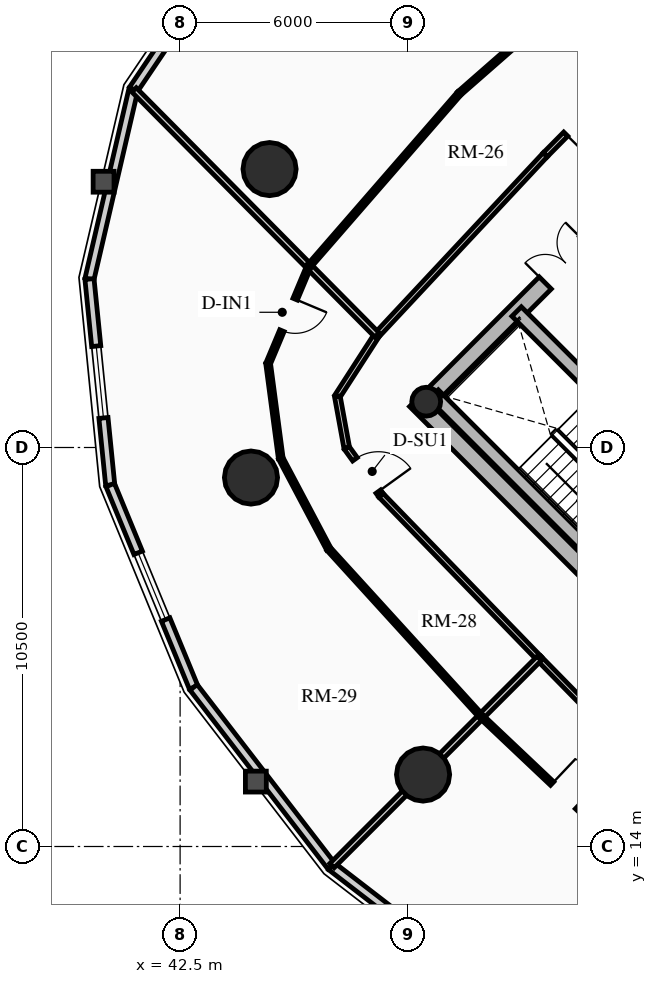
"""IFC4 building model, lengths in metres.
Left out: names, types, materials, properties, quantities, classifications, styles, units other than length and angle.
Written with IfcOpenShell. Run it as: python <this file> out.ifc"""

import sys

from ifc_helpers import new_model, si_unit, direction, frame, frame_2d, origin, origin_2d, place, context, subcontext, project, spatial, rectangle, circle, hollow_circle, extrude, source, transform, mapped, element, fill, save


model = new_model("IFC4")
c1 = context("Model", 3, precision=1e-05, world=origin(), true_north=direction((0.0, 1.0)))
c2 = subcontext(c1, "Body", "Model", "MODEL_VIEW")
j1 = project(units=[si_unit("LENGTHUNIT", "METRE"), si_unit("PLANEANGLEUNIT", "RADIAN")], contexts=[c1])
p1 = place(None, origin())
s1 = spatial("IfcSite", under=j1, at=p1, CompositionType="ELEMENT")
p2 = place(p1, origin())
s2 = spatial("IfcBuilding", under=s1, at=p2, CompositionType="ELEMENT")
p3 = place(p2, frame((0.0, 0.0, 87.61)))
s3 = spatial("IfcBuildingStorey", under=s2, at=p3, CompositionType="ELEMENT", Elevation=87.61)
p4 = place(p3, frame((58.737, 15.697, 0.0), z_axis=(0.0, 0.0, 1.0), x_axis=(-0.707106781187, 0.707106781187, 0.0)))
e1 = element("IfcWall", 1, at=p4, inside=s3, PredefinedType="SHEAR", context=c2, shape_type="SweptSolid", body=[
    extrude(rectangle(XDim=14.2, YDim=0.45, at=frame_2d((7.1, 0.0))), origin(), (0.0, 0.0, 1.0), 2.91),
])
p5 = place(p3, frame((48.856, 25.578, 0.0), z_axis=(0.0, 0.0, 1.0), x_axis=(0.707106781187, 0.707106781187, 0.0)))
e2 = element("IfcWall", 2, at=p5, inside=s3, PredefinedType="SHEAR", context=c2, shape_type="SweptSolid", body=[
    extrude(rectangle(XDim=10.7, YDim=0.45, at=frame_2d((5.35, 0.0))), origin(), (0.0, 0.0, 1.0), 2.91),
])
m1 = source(origin(), c2, "Body", "SweptSolid", [
    extrude(rectangle(XDim=1.5, YDim=2.02, at=frame_2d((0.75, 1.01))), frame((0.0, 0.235, 0.0), z_axis=(0.0, -1.0, 0.0), x_axis=(1.0, 0.0, 0.0)), (0.0, 0.0, 1.0), 0.47),
])
p6 = place(p5, frame((4.6, 0.0, 0.0)))
e3 = element("IfcOpeningElement", 3, at=p6, cuts=e2, PredefinedType="OPENING", context=c2, shape_type="MappedRepresentation", body=[
    mapped(m1, transform((0.0, 0.0, 0.0), x_axis=(1.0, 0.0, 0.0), y_axis=(0.0, 1.0, 0.0), z_axis=(0.0, 0.0, 1.0), scale=1.0)),
])
p7 = place(p3, frame((61.078, 18.355, 0.0), z_axis=(0.0, 0.0, 1.0), x_axis=(-0.707106781187, 0.707106781187, 0.0)))
e4 = element("IfcWall", 4, at=p7, inside=s3, PredefinedType="SHEAR", context=c2, shape_type="SweptSolid", body=[
    extrude(rectangle(XDim=13.75, YDim=0.35, at=frame_2d((6.875, 0.0))), origin(), (0.0, 0.0, 1.0), 2.91),
])
m2 = source(origin(), c2, "Body", "SweptSolid", [
    extrude(rectangle(XDim=1.1, YDim=2.015, at=frame_2d((0.55, 1.007))), frame((0.0, 0.185, 0.0), z_axis=(0.0, -1.0, 0.0), x_axis=(1.0, 0.0, 0.0)), (0.0, 0.0, 1.0), 0.37),
])
p8 = place(p7, frame((4.875, 0.0, 0.0)))
e5 = element("IfcOpeningElement", 5, at=p8, cuts=e4, PredefinedType="OPENING", context=c2, shape_type="MappedRepresentation", body=[
    mapped(m2, transform((0.0, 0.0, 0.0), x_axis=(1.0, 0.0, 0.0), y_axis=(0.0, 1.0, 0.0), z_axis=(0.0, 0.0, 1.0), scale=1.0)),
])
m3 = source(origin(), c2, "Body", "SweptSolid", [
    extrude(rectangle(XDim=1.15, YDim=2.02, at=frame_2d((0.575, 1.01))), frame((0.0, 0.185, 0.0), z_axis=(0.0, -1.0, 0.0), x_axis=(1.0, 0.0, 0.0)), (0.0, 0.0, 1.0), 0.37),
])
p9 = place(p7, frame((7.295, 0.0, 0.0)))
e6 = element("IfcOpeningElement", 6, at=p9, cuts=e4, PredefinedType="OPENING", context=c2, shape_type="MappedRepresentation", body=[
    mapped(m3, transform((0.0, 0.0, 0.0), x_axis=(1.0, 0.0, 0.0), y_axis=(0.0, 1.0, 0.0), z_axis=(0.0, 0.0, 1.0), scale=1.0)),
])
p10 = place(p3, frame((53.922, 21.141, 0.0), z_axis=(0.0, 0.0, 1.0), x_axis=(-0.707088616009, 0.707124945897, 0.0)))
e7 = element("IfcWall", 7, at=p10, inside=s3, PredefinedType="SHEAR", context=c2, shape_type="SweptSolid", body=[
    extrude(rectangle(XDim=6.72, YDim=0.35, at=frame_2d((3.36, 0.0))), origin(), (0.0, 0.0, 1.0), 2.91),
])
p11 = place(p3, frame((48.976, 25.706, 0.0), z_axis=(0.0, 0.0, 1.0), x_axis=(0.707106781187, 0.707106781187, 0.0)))
e8 = element("IfcColumn", 8, at=p11, inside=s3, PredefinedType="COLUMN", context=c2, shape_type="SweptSolid", body=[
    extrude(hollow_circle(Radius=0.38, WallThickness=0.032, at=origin_2d()), origin(), (0.0, 0.0, 1.0), 2.91),
])
for number, where, z_axis, x_axis in (
    (9, (44.854, 31.827, 0.0), (0.0, 0.0, 1.0), (1.0, 0.0, 0.0)),
    (10, (44.365, 23.709, 0.0), (0.0, 0.0, 1.0), (1.0, 0.0, 0.0)),
    (11, (48.893, 15.893, 0.0), (0.0, 0.0, 1.0), (1.0, 0.0, 0.0)),
):
    element("IfcColumn", number, at=place(p3, frame(where, z_axis=z_axis, x_axis=x_axis)), inside=s3, PredefinedType="USERDEFINED", context=c2, shape_type="SweptSolid", body=[
        extrude(circle(Radius=0.7, at=origin_2d()), origin(), (0.0, 0.0, 1.0), 2.91),
    ])
p12 = place(p3, frame((41.271, 33.92, 0.0), z_axis=(0.0, 0.0, 1.0), x_axis=(0.559572880421, 0.828781148131, 0.0)))
e12 = element("IfcWall", 12, at=p12, inside=s3, PredefinedType="SOLIDWALL", context=c2, shape_type="SweptSolid", body=[
    extrude(rectangle(XDim=4.905, YDim=0.24, at=frame_2d((2.452, 0.0))), origin(), (0.0, 0.0, 1.0), 2.179),
])
m4 = source(origin(), c2, "Body", "SweptSolid", [
    extrude(rectangle(XDim=1.9, YDim=1.35, at=frame_2d((0.95, 0.675))), frame((0.0, 0.13, 0.0), z_axis=(0.0, -1.0, 0.0), x_axis=(1.0, 0.0, 0.0)), (0.0, 0.0, 1.0), 0.26),
])
p13 = place(p12, frame((1.502, 0.0, 0.65)))
e13 = element("IfcOpeningElement", 13, at=p13, cuts=e12, PredefinedType="OPENING", context=c2, shape_type="MappedRepresentation", body=[
    mapped(m4, transform((0.0, 0.0, 0.0), x_axis=(1.0, 0.0, 0.0), y_axis=(0.0, 1.0, 0.0), z_axis=(0.0, 0.0, 1.0), scale=1.0)),
])
p14 = place(p3, frame((40.115, 28.933, 0.0), z_axis=(0.0, 0.0, 1.0), x_axis=(0.225834725257, 0.974165631126, 0.0)))
e14 = element("IfcWall", 14, at=p14, inside=s3, PredefinedType="SOLIDWALL", context=c2, shape_type="SweptSolid", body=[
    extrude(rectangle(XDim=5.119, YDim=0.24, at=frame_2d((2.56, 0.0))), origin(), (0.0, 0.0, 1.0), 2.179),
])
p15 = place(p3, frame((40.661, 23.513, 0.0), z_axis=(0.0, 0.0, 1.0), x_axis=(-0.10015591906, 0.994971754311, 0.0)))
e15 = element("IfcWall", 15, at=p15, inside=s3, PredefinedType="SOLIDWALL", context=c2, shape_type="SweptSolid", body=[
    extrude(rectangle(XDim=5.448, YDim=0.24, at=frame_2d((2.724, 0.0))), origin(), (0.0, 0.0, 1.0), 2.179),
])
p16 = place(p15, frame((1.774, 0.0, 0.65)))
e16 = element("IfcOpeningElement", 16, at=p16, cuts=e15, PredefinedType="OPENING", context=c2, shape_type="MappedRepresentation", body=[
    mapped(m4, transform((0.0, 0.0, 0.0), x_axis=(1.0, 0.0, 0.0), y_axis=(0.0, 1.0, 0.0), z_axis=(0.0, 0.0, 1.0), scale=1.0)),
])
p17 = place(p3, frame((42.855, 18.189, 0.0), z_axis=(0.0, 0.0, 1.0), x_axis=(-0.381027003055, 0.924563909604, 0.0)))
e17 = element("IfcWall", 17, at=p17, inside=s3, PredefinedType="SOLIDWALL", context=c2, shape_type="SweptSolid", body=[
    extrude(rectangle(XDim=5.758, YDim=0.24, at=frame_2d((2.879, 0.0))), origin(), (0.0, 0.0, 1.0), 2.179),
])
p18 = place(p17, frame((1.929, 0.0, 0.65)))
e18 = element("IfcOpeningElement", 18, at=p18, cuts=e17, PredefinedType="OPENING", context=c2, shape_type="MappedRepresentation", body=[
    mapped(m4, transform((0.0, 0.0, 0.0), x_axis=(1.0, 0.0, 0.0), y_axis=(0.0, 1.0, 0.0), z_axis=(0.0, 0.0, 1.0), scale=1.0)),
])
p19 = place(p3, frame((46.483, 13.483, 0.0), z_axis=(0.0, 0.0, 1.0), x_axis=(-0.61054437102, 0.791982052206, 0.0)))
e19 = element("IfcWall", 19, at=p19, inside=s3, PredefinedType="SOLIDWALL", context=c2, shape_type="SweptSolid", body=[
    extrude(rectangle(XDim=5.942, YDim=0.24, at=frame_2d((2.971, 0.0))), origin(), (0.0, 0.0, 1.0), 2.179),
])
p20 = place(p3, frame((51.189, 9.855, 0.0), z_axis=(0.0, 0.0, 1.0), x_axis=(-0.791982052206, 0.61054437102, 0.0)))
e20 = element("IfcWall", 20, at=p20, inside=s3, PredefinedType="SOLIDWALL", context=c2, shape_type="SweptSolid", body=[
    extrude(rectangle(XDim=5.942, YDim=0.24, at=frame_2d((2.971, 0.0))), origin(), (0.0, 0.0, 1.0), 2.179),
])
p21 = place(p20, frame((2.021, 0.0, 0.65)))
e21 = element("IfcOpeningElement", 21, at=p21, cuts=e20, PredefinedType="OPENING", context=c2, shape_type="MappedRepresentation", body=[
    mapped(m4, transform((0.0, 0.0, 0.0), x_axis=(1.0, 0.0, 0.0), y_axis=(0.0, 1.0, 0.0), z_axis=(0.0, 0.0, 1.0), scale=1.0)),
])
p22 = place(p3, frame((54.475, 34.591, 0.0), z_axis=(0.0, 0.0, 1.0), x_axis=(-0.703869646439, -0.710329163714, 0.0)))
e22 = element("IfcWall", 22, at=p22, inside=s3, PredefinedType="PARTITIONING", context=c2, shape_type="SweptSolid", body=[
    extrude(rectangle(XDim=3.364, YDim=0.15, at=frame_2d((1.682, 0.0))), origin(), (0.0, 0.0, 1.0), 2.225),
])
m5 = source(origin(), c2, "Body", "SweptSolid", [
    extrude(rectangle(XDim=1.05, YDim=2.015, at=frame_2d((0.525, 1.007))), frame((0.0, 0.085, 0.0), z_axis=(0.0, -1.0, 0.0), x_axis=(1.0, 0.0, 0.0)), (0.0, 0.0, 1.0), 0.17),
])
p23 = place(p22, frame((1.546, 0.0, 0.0)))
e23 = element("IfcOpeningElement", 23, at=p23, cuts=e22, PredefinedType="OPENING", context=c2, shape_type="MappedRepresentation", body=[
    mapped(m5, transform((0.0, 0.0, 0.0), x_axis=(1.0, 0.0, 0.0), y_axis=(0.0, 1.0, 0.0), z_axis=(0.0, 0.0, 1.0), scale=1.0)),
])
p24 = place(p3, frame((52.107, 32.202, 0.0), z_axis=(0.0, 0.0, 1.0), x_axis=(-0.682605209028, -0.730787334734, 0.0)))
e24 = element("IfcWall", 24, at=p24, inside=s3, PredefinedType="PARTITIONING", context=c2, shape_type="SweptSolid", body=[
    extrude(rectangle(XDim=6.486, YDim=0.15, at=frame_2d((3.243, 0.0))), origin(), (0.0, 0.0, 1.0), 2.225),
])
p25 = place(p3, frame((47.68, 27.462, 0.0), z_axis=(0.0, 0.0, 1.0), x_axis=(-0.542097952486, -0.840315303865, 0.0)))
e25 = element("IfcWall", 25, at=p25, inside=s3, PredefinedType="PARTITIONING", context=c2, shape_type="SweptSolid", body=[
    extrude(rectangle(XDim=1.923, YDim=0.15, at=frame_2d((0.961, 0.0))), origin(), (0.0, 0.0, 1.0), 2.225),
])
p26 = place(p3, frame((46.637, 25.846, 0.0), z_axis=(0.0, 0.0, 1.0), x_axis=(0.179617307107, -0.983736561782, 0.0)))
e26 = element("IfcWall", 26, at=p26, inside=s3, PredefinedType="PARTITIONING", context=c2, shape_type="SweptSolid", body=[
    extrude(rectangle(XDim=1.38, YDim=0.15, at=frame_2d((0.69, 0.0))), origin(), (0.0, 0.0, 1.0), 2.225),
])
p27 = place(p3, frame((46.885, 24.489, 0.0), z_axis=(0.0, 0.0, 1.0), x_axis=(0.585716430945, -0.810516047047, 0.0)))
e27 = element("IfcWall", 27, at=p27, inside=s3, PredefinedType="PARTITIONING", context=c2, shape_type="SweptSolid", body=[
    extrude(rectangle(XDim=1.539, YDim=0.15, at=frame_2d((0.77, 0.0))), origin(), (0.0, 0.0, 1.0), 2.225),
])
p28 = place(p27, frame((0.369, 0.0, 0.0)))
e28 = element("IfcOpeningElement", 28, at=p28, cuts=e27, PredefinedType="OPENING", context=c2, shape_type="MappedRepresentation", body=[
    mapped(m5, transform((0.0, 0.0, 0.0), x_axis=(1.0, 0.0, 0.0), y_axis=(0.0, 1.0, 0.0), z_axis=(0.0, 0.0, 1.0), scale=1.0)),
])
p29 = place(p3, frame((47.786, 23.242, 0.0), z_axis=(0.0, 0.0, 1.0), x_axis=(0.696183456981, -0.717863910659, 0.0)))
e29 = element("IfcWall", 29, at=p29, inside=s3, PredefinedType="PARTITIONING", context=c2, shape_type="SweptSolid", body=[
    extrude(rectangle(XDim=5.979, YDim=0.15, at=frame_2d((2.99, 0.0))), origin(), (0.0, 0.0, 1.0), 2.655),
])
p30 = place(p3, frame((51.949, 18.949, 0.0), z_axis=(0.0, 0.0, 1.0), x_axis=(0.699801520154, -0.714337337951, 0.0)))
e30 = element("IfcWall", 30, at=p30, inside=s3, PredefinedType="PARTITIONING", context=c2, shape_type="SweptSolid", body=[
    extrude(rectangle(XDim=6.097, YDim=0.15, at=frame_2d((3.048, 0.0))), origin(), (0.0, 0.0, 1.0), 2.225),
])
p31 = place(p3, frame((47.68, 27.462, 0.0), z_axis=(0.0, 0.0, 1.0), x_axis=(-0.703913074907, 0.710286127539, 0.0)))
e31 = element("IfcWall", 31, at=p31, inside=s3, PredefinedType="PARTITIONING", context=c2, shape_type="SweptSolid", body=[
    extrude(rectangle(XDim=9.079, YDim=0.16, at=frame_2d((4.54, 0.0))), origin(), (0.0, 0.0, 1.0), 2.179),
])
p32 = place(p3, frame((51.949, 18.949, 0.0), z_axis=(0.0, 0.0, 1.0), x_axis=(-0.707106781187, -0.707106781187, 0.0)))
e32 = element("IfcWall", 32, at=p32, inside=s3, PredefinedType="PARTITIONING", context=c2, shape_type="SweptSolid", body=[
    extrude(rectangle(XDim=7.711, YDim=0.16, at=frame_2d((3.855, 0.0))), origin(), (0.0, 0.0, 1.0), 2.179),
])
p33 = place(p3, frame((52.687, 36.305, 0.0), z_axis=(0.0, 0.0, 1.0), x_axis=(-0.752332345919, -0.658783759123, 0.0)))
e33 = element("IfcWall", 33, at=p33, inside=s3, PredefinedType="PARTITIONING", context=c2, shape_type="SweptSolid", body=[
    extrude(rectangle(XDim=3.776, YDim=0.125, at=frame_2d((1.888, 0.0))), origin(), (0.0, 0.0, 1.0), 2.225),
])
p34 = place(p3, frame((49.845, 33.817, 0.0), z_axis=(0.0, 0.0, 1.0), x_axis=(-0.656101508867, -0.754672650931, 0.0)))
e34 = element("IfcWall", 34, at=p34, inside=s3, PredefinedType="PARTITIONING", context=c2, shape_type="SweptSolid", body=[
    extrude(rectangle(XDim=6.029, YDim=0.125, at=frame_2d((3.014, 0.0))), origin(), (0.0, 0.0, 1.0), 2.225),
])
p35 = place(p3, frame((45.89, 29.268, 0.0), z_axis=(0.0, 0.0, 1.0), x_axis=(-0.387057419757, -0.922055613188, 0.0)))
e35 = element("IfcWall", 35, at=p35, inside=s3, PredefinedType="PARTITIONING", context=c2, shape_type="SweptSolid", body=[
    extrude(rectangle(XDim=2.774, YDim=0.125, at=frame_2d((1.387, 0.0))), origin(), (0.0, 0.0, 1.0), 2.225),
])
m6 = source(origin(), c2, "Body", "SweptSolid", [
    extrude(rectangle(XDim=0.9, YDim=2.005, at=frame_2d((0.45, 1.002))), frame((0.0, 0.073, 0.0), z_axis=(0.0, -1.0, 0.0), x_axis=(1.0, 0.0, 0.0)), (0.0, 0.0, 1.0), 0.145),
])
p36 = place(p35, frame((0.937, 0.0, 0.0)))
e36 = element("IfcOpeningElement", 36, at=p36, cuts=e35, PredefinedType="OPENING", context=c2, shape_type="MappedRepresentation", body=[
    mapped(m6, transform((0.0, 0.0, 0.0), x_axis=(1.0, 0.0, 0.0), y_axis=(0.0, 1.0, 0.0), z_axis=(0.0, 0.0, 1.0), scale=1.0)),
])
p37 = place(p3, frame((44.816, 26.71, 0.0), z_axis=(0.0, 0.0, 1.0), x_axis=(0.131724981355, -0.991286300363, 0.0)))
e37 = element("IfcWall", 37, at=p37, inside=s3, PredefinedType="PARTITIONING", context=c2, shape_type="SweptSolid", body=[
    extrude(rectangle(XDim=2.515, YDim=0.125, at=frame_2d((1.258, 0.0))), origin(), (0.0, 0.0, 1.0), 2.655),
])
p38 = place(p3, frame((45.148, 24.217, 0.0), z_axis=(0.0, 0.0, 1.0), x_axis=(0.46760107134, -0.883939612237, 0.0)))
e38 = element("IfcWall", 38, at=p38, inside=s3, PredefinedType="PARTITIONING", context=c2, shape_type="SweptSolid", body=[
    extrude(rectangle(XDim=2.7, YDim=0.125, at=frame_2d((1.35, 0.0))), origin(), (0.0, 0.0, 1.0), 2.225),
])
p39 = place(p3, frame((46.41, 21.83, 0.0), z_axis=(0.0, 0.0, 1.0), x_axis=(0.6732109009, -0.739450527696, 0.0)))
e39 = element("IfcWall", 39, at=p39, inside=s3, PredefinedType="PARTITIONING", context=c2, shape_type="SweptSolid", body=[
    extrude(rectangle(XDim=5.96, YDim=0.125, at=frame_2d((2.98, 0.0))), origin(), (0.0, 0.0, 1.0), 2.655),
])
p40 = place(p3, frame((50.423, 17.423, 0.0), z_axis=(0.0, 0.0, 1.0), x_axis=(0.726497320663, -0.68716929724, 0.0)))
e40 = element("IfcWall", 40, at=p40, inside=s3, PredefinedType="PARTITIONING", context=c2, shape_type="SweptSolid", body=[
    extrude(rectangle(XDim=6.04, YDim=0.125, at=frame_2d((3.02, 0.0))), origin(), (0.0, 0.0, 1.0), 2.225),
])
p41 = place(p40, frame((2.57, 0.0, 0.0)))
e41 = element("IfcOpeningElement", 41, at=p41, cuts=e40, PredefinedType="OPENING", context=c2, shape_type="MappedRepresentation", body=[
    mapped(m6, transform((0.0, 0.0, 0.0), x_axis=(1.0, 0.0, 0.0), y_axis=(0.0, 1.0, 0.0), z_axis=(0.0, 0.0, 1.0), scale=1.0)),
])
m7 = source(origin(), c2, "Body", "SweptSolid", [
    extrude(rectangle(XDim=1.9, YDim=1.35, at=frame_2d((0.95, 0.675))), frame((0.0, 0.03, 0.0), z_axis=(0.0, -1.0, 0.0), x_axis=(1.0, 0.0, 0.0)), (0.0, 0.0, 1.0), 0.06),
])
p42 = place(p16, origin())
e42 = element("IfcWindow", 42, at=p42, inside=s3, PartitioningType="DOUBLE_PANEL_VERTICAL", PredefinedType="WINDOW", context=c2, shape_type="MappedRepresentation", body=[
    mapped(m7, transform((0.0, 0.0, 0.0), x_axis=(1.0, 0.0, 0.0), y_axis=(0.0, 1.0, 0.0), z_axis=(0.0, 0.0, 1.0), scale=1.0)),
])
fill(e16, e42)
p43 = place(p18, origin())
e43 = element("IfcWindow", 43, at=p43, inside=s3, PartitioningType="DOUBLE_PANEL_VERTICAL", PredefinedType="WINDOW", context=c2, shape_type="MappedRepresentation", body=[
    mapped(m7, transform((0.0, 0.0, 0.0), x_axis=(1.0, 0.0, 0.0), y_axis=(0.0, 1.0, 0.0), z_axis=(0.0, 0.0, 1.0), scale=1.0)),
])
fill(e18, e43)
m8 = source(origin(), c2, "Body", "SweptSolid", [
    extrude(rectangle(XDim=1.5, YDim=2.02, at=frame_2d((0.75, 1.01))), frame((0.0, 0.025, 0.0), z_axis=(0.0, -1.0, 0.0), x_axis=(1.0, 0.0, 0.0)), (0.0, 0.0, 1.0), 0.05),
])
p44 = place(p6, origin())
e44 = element("IfcDoor", 44, at=p44, inside=s3, OperationType="DOUBLE_DOOR_SINGLE_SWING", PredefinedType="DOOR", context=c2, shape_type="MappedRepresentation", body=[
    mapped(m8, transform((0.0, 0.0, 0.0), x_axis=(1.0, 0.0, 0.0), y_axis=(0.0, 1.0, 0.0), z_axis=(0.0, 0.0, 1.0), scale=1.0)),
])
fill(e3, e44)
m9 = source(origin(), c2, "Body", "SweptSolid", [
    extrude(rectangle(XDim=1.05, YDim=2.015, at=frame_2d((0.525, 1.007))), frame((0.0, 0.025, 0.0), z_axis=(0.0, -1.0, 0.0), x_axis=(1.0, 0.0, 0.0)), (0.0, 0.0, 1.0), 0.05),
])
p45 = place(p23, origin())
e45 = element("IfcDoor", 45, at=p45, inside=s3, OperationType="SINGLE_SWING_RIGHT", PredefinedType="DOOR", context=c2, shape_type="MappedRepresentation", body=[
    mapped(m9, transform((0.0, 0.0, 0.0), x_axis=(1.0, 0.0, 0.0), y_axis=(0.0, 1.0, 0.0), z_axis=(0.0, 0.0, 1.0), scale=1.0)),
])
fill(e23, e45)
p46 = place(p28, origin())
e46 = element("IfcDoor", 46, at=p46, inside=s3, OperationType="SINGLE_SWING_RIGHT", PredefinedType="DOOR", context=c2, shape_type="MappedRepresentation", body=[
    mapped(m9, transform((0.0, 0.0, 0.0), x_axis=(1.0, 0.0, 0.0), y_axis=(0.0, 1.0, 0.0), z_axis=(0.0, 0.0, 1.0), scale=1.0)),
])
fill(e28, e46)
m10 = source(origin(), c2, "Body", "SweptSolid", [
    extrude(rectangle(XDim=0.9, YDim=2.005, at=frame_2d((0.45, 1.002))), frame((0.0, 0.025, 0.0), z_axis=(0.0, -1.0, 0.0), x_axis=(1.0, 0.0, 0.0)), (0.0, 0.0, 1.0), 0.05),
])
p47 = place(p36, origin())
e47 = element("IfcDoor", 47, at=p47, inside=s3, OperationType="SINGLE_SWING_LEFT", PredefinedType="DOOR", context=c2, shape_type="MappedRepresentation", body=[
    mapped(m10, transform((0.0, 0.0, 0.0), x_axis=(1.0, 0.0, 0.0), y_axis=(0.0, 1.0, 0.0), z_axis=(0.0, 0.0, 1.0), scale=1.0)),
])
fill(e36, e47)
p48 = place(p41, origin())
e48 = element("IfcDoor", 48, at=p48, inside=s3, OperationType="SINGLE_SWING_LEFT", PredefinedType="DOOR", context=c2, shape_type="MappedRepresentation", body=[
    mapped(m10, transform((0.0, 0.0, 0.0), x_axis=(1.0, 0.0, 0.0), y_axis=(0.0, 1.0, 0.0), z_axis=(0.0, 0.0, 1.0), scale=1.0)),
])
fill(e41, e48)
save(model, sys.argv[1])
